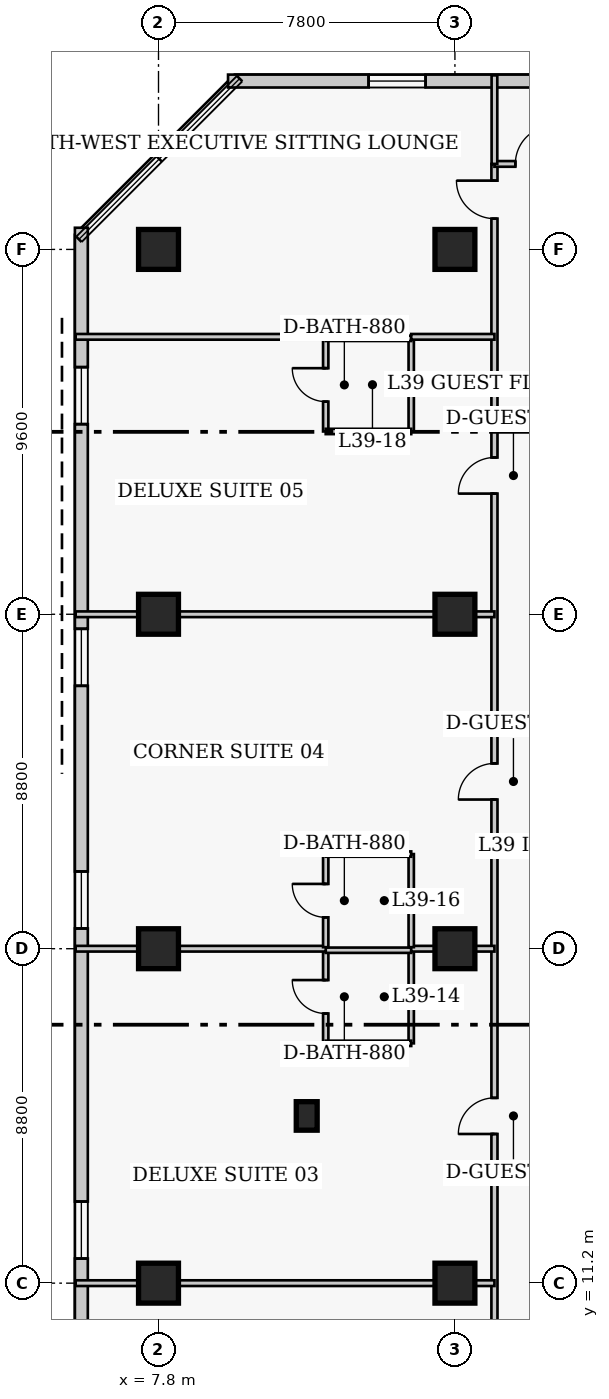
"""IFC4 building model, lengths in metres.
Left out: names, types, materials, properties, quantities, classifications, styles, units other than length and angle.
Written with IfcOpenShell. Run it as: python <this file> out.ifc"""

import sys

from ifc_helpers import new_model, si_unit, direction, frame, frame_2d, origin, origin_2d, place, context, subcontext, project, spatial, rectangle, extrude, element, fill, save


model = new_model("IFC4")
c1 = context("Model", 3, precision=1e-05, world=origin(), true_north=direction((0.0, 1.0)))
c2 = subcontext(c1, "Body", "Model", "MODEL_VIEW")
j1 = project(units=[si_unit("LENGTHUNIT", "METRE"), si_unit("PLANEANGLEUNIT", "RADIAN")], contexts=[c1])
p1 = place(None, origin())
s1 = spatial("IfcSite", under=j1, at=p1, CompositionType="ELEMENT")
p2 = place(p1, origin())
s2 = spatial("IfcBuilding", under=s1, at=p2, CompositionType="ELEMENT")
p3 = place(p2, frame((0.0, 0.0, 157.4)))
s3 = spatial("IfcBuildingStorey", under=s2, at=p3, CompositionType="ELEMENT", Elevation=157.4)
for number, where, z_axis, x_axis in (
    (1, (7.8, 11.2, 0.0), (0.0, 0.0, 1.0), (1.0, 0.0, 0.0)),
    (2, (7.8, 20.0, 0.0), (0.0, 0.0, 1.0), (1.0, 0.0, 0.0)),
    (3, (7.8, 28.8, 0.0), (0.0, 0.0, 1.0), (1.0, 0.0, 0.0)),
    (4, (7.8, 38.4, 0.0), (0.0, 0.0, 1.0), (1.0, 0.0, 0.0)),
    (5, (15.6, 11.2, 0.0), (0.0, 0.0, 1.0), (1.0, 0.0, 0.0)),
    (6, (15.6, 20.0, 0.0), (0.0, 0.0, 1.0), (1.0, 0.0, 0.0)),
    (7, (15.6, 28.8, 0.0), (0.0, 0.0, 1.0), (1.0, 0.0, 0.0)),
    (8, (15.6, 38.4, 0.0), (0.0, 0.0, 1.0), (1.0, 0.0, 0.0)),
):
    element("IfcColumn", number, at=place(p3, frame(where, z_axis=z_axis, x_axis=x_axis)), inside=s3, PredefinedType="COLUMN", context=c2, shape_type="SweptSolid", body=[
        extrude(rectangle(XDim=1.05, YDim=1.05, at=origin_2d()), origin(), (0.0, 0.0, 1.0), 3.8),
    ])
p4 = place(p3, frame((11.7, 15.6, 0.0), z_axis=(0.0, 0.0, 1.0), x_axis=(1.0, 0.0, 0.0)))
e9 = element("IfcColumn", 9, at=p4, inside=s3, PredefinedType="PILASTER", context=c2, shape_type="SweptSolid", body=[
    extrude(rectangle(XDim=0.55, YDim=0.75, at=origin_2d()), origin(), (0.0, 0.0, 1.0), 3.8),
])
p5 = place(p3, frame((36.32, 42.83, 0.0), z_axis=(0.0, 0.0, 1.0), x_axis=(-1.0, 0.0, 0.0)))
e10 = element("IfcWall", 10, at=p5, inside=s3, PredefinedType="SOLIDWALL", context=c2, shape_type="SweptSolid", body=[
    extrude(rectangle(XDim=26.69, YDim=0.34, at=frame_2d((13.345, 0.0))), origin(), (0.0, 0.0, 1.0), 3.55),
])
p6 = place(p5, frame((2.548, 0.0, 0.85)))
e11 = element("IfcOpeningElement", 11, at=p6, cuts=e10, PredefinedType="OPENING", context=c2, shape_type="SweptSolid", body=[
    extrude(rectangle(XDim=1.5, YDim=1.75, at=frame_2d((0.75, 0.875))), frame((0.0, 0.18, 0.0), z_axis=(0.0, -1.0, 0.0), x_axis=(1.0, 0.0, 0.0)), (0.0, 0.0, 1.0), 0.36),
])
p7 = place(p5, frame((12.595, 0.0, 0.85)))
e12 = element("IfcOpeningElement", 12, at=p7, cuts=e10, PredefinedType="OPENING", context=c2, shape_type="SweptSolid", body=[
    extrude(rectangle(XDim=1.5, YDim=1.75, at=frame_2d((0.75, 0.875))), frame((0.0, 0.18, 0.0), z_axis=(0.0, -1.0, 0.0), x_axis=(1.0, 0.0, 0.0)), (0.0, 0.0, 1.0), 0.36),
])
p8 = place(p5, frame((21.492, 0.0, 0.85)))
e13 = element("IfcOpeningElement", 13, at=p8, cuts=e10, PredefinedType="OPENING", context=c2, shape_type="SweptSolid", body=[
    extrude(rectangle(XDim=1.5, YDim=1.75, at=frame_2d((0.75, 0.875))), frame((0.0, 0.18, 0.0), z_axis=(0.0, -1.0, 0.0), x_axis=(1.0, 0.0, 0.0)), (0.0, 0.0, 1.0), 0.36),
])
p9 = place(p3, frame((5.77, 38.97, 0.0), z_axis=(0.0, 0.0, 1.0), x_axis=(0.0, -1.0, 0.0)))
e14 = element("IfcWall", 14, at=p9, inside=s3, PredefinedType="SOLIDWALL", context=c2, shape_type="SweptSolid", body=[
    extrude(rectangle(XDim=30.14, YDim=0.34, at=frame_2d((15.07, 0.0))), origin(), (0.0, 0.0, 1.0), 3.55),
])
p10 = place(p9, frame((3.667, 0.0, 0.85)))
e15 = element("IfcOpeningElement", 15, at=p10, cuts=e14, PredefinedType="OPENING", context=c2, shape_type="SweptSolid", body=[
    extrude(rectangle(XDim=1.5, YDim=1.75, at=frame_2d((0.75, 0.875))), frame((0.0, 0.18, 0.0), z_axis=(0.0, -1.0, 0.0), x_axis=(1.0, 0.0, 0.0)), (0.0, 0.0, 1.0), 0.36),
])
p11 = place(p9, frame((10.552, 0.0, 0.85)))
e16 = element("IfcOpeningElement", 16, at=p11, cuts=e14, PredefinedType="OPENING", context=c2, shape_type="SweptSolid", body=[
    extrude(rectangle(XDim=1.5, YDim=1.75, at=frame_2d((0.75, 0.875))), frame((0.0, 0.18, 0.0), z_axis=(0.0, -1.0, 0.0), x_axis=(1.0, 0.0, 0.0)), (0.0, 0.0, 1.0), 0.36),
])
p12 = place(p9, frame((16.938, 0.0, 0.85)))
e17 = element("IfcOpeningElement", 17, at=p12, cuts=e14, PredefinedType="OPENING", context=c2, shape_type="SweptSolid", body=[
    extrude(rectangle(XDim=1.5, YDim=1.75, at=frame_2d((0.75, 0.875))), frame((0.0, 0.18, 0.0), z_axis=(0.0, -1.0, 0.0), x_axis=(1.0, 0.0, 0.0)), (0.0, 0.0, 1.0), 0.36),
])
p13 = place(p9, frame((25.623, 0.0, 0.85)))
e18 = element("IfcOpeningElement", 18, at=p13, cuts=e14, PredefinedType="OPENING", context=c2, shape_type="SweptSolid", body=[
    extrude(rectangle(XDim=1.5, YDim=1.75, at=frame_2d((0.75, 0.875))), frame((0.0, 0.18, 0.0), z_axis=(0.0, -1.0, 0.0), x_axis=(1.0, 0.0, 0.0)), (0.0, 0.0, 1.0), 0.36),
])
p14 = place(p3, frame((16.64, 6.85, 0.0), z_axis=(0.0, 0.0, 1.0), x_axis=(0.0, 1.0, 0.0)))
e19 = element("IfcWall", 19, at=p14, inside=s3, PredefinedType="PARTITIONING", context=c2, shape_type="SweptSolid", body=[
    extrude(rectangle(XDim=33.8, YDim=0.16, at=frame_2d((16.9, 0.0))), origin(), (0.0, 0.0, 1.0), 3.55),
])
p15 = place(p14, frame((1.7, 0.0, 0.0)))
e20 = element("IfcOpeningElement", 20, at=p15, cuts=e19, PredefinedType="OPENING", context=c2, shape_type="SweptSolid", body=[
    extrude(rectangle(XDim=0.95, YDim=2.1, at=frame_2d((0.475, 1.05))), frame((0.0, 0.09, 0.0), z_axis=(0.0, -1.0, 0.0), x_axis=(1.0, 0.0, 0.0)), (0.0, 0.0, 1.0), 0.18),
])
p16 = place(p14, frame((8.275, 0.0, 0.0)))
e21 = element("IfcOpeningElement", 21, at=p16, cuts=e19, PredefinedType="OPENING", context=c2, shape_type="SweptSolid", body=[
    extrude(rectangle(XDim=0.95, YDim=2.1, at=frame_2d((0.475, 1.05))), frame((0.0, 0.09, 0.0), z_axis=(0.0, -1.0, 0.0), x_axis=(1.0, 0.0, 0.0)), (0.0, 0.0, 1.0), 0.18),
])
p17 = place(p14, frame((17.075, 0.0, 0.0)))
e22 = element("IfcOpeningElement", 22, at=p17, cuts=e19, PredefinedType="OPENING", context=c2, shape_type="SweptSolid", body=[
    extrude(rectangle(XDim=0.95, YDim=2.1, at=frame_2d((0.475, 1.05))), frame((0.0, 0.09, 0.0), z_axis=(0.0, -1.0, 0.0), x_axis=(1.0, 0.0, 0.0)), (0.0, 0.0, 1.0), 0.18),
])
p18 = place(p14, frame((25.125, 0.0, 0.0)))
e23 = element("IfcOpeningElement", 23, at=p18, cuts=e19, PredefinedType="OPENING", context=c2, shape_type="SweptSolid", body=[
    extrude(rectangle(XDim=0.95, YDim=2.1, at=frame_2d((0.475, 1.05))), frame((0.0, 0.09, 0.0), z_axis=(0.0, -1.0, 0.0), x_axis=(1.0, 0.0, 0.0)), (0.0, 0.0, 1.0), 0.18),
])
p19 = place(p14, frame((32.36, 0.0, 0.0)))
e24 = element("IfcOpeningElement", 24, at=p19, cuts=e19, PredefinedType="OPENING", context=c2, shape_type="SweptSolid", body=[
    extrude(rectangle(XDim=1.0, YDim=2.15, at=frame_2d((0.5, 1.075))), frame((0.0, 0.09, 0.0), z_axis=(0.0, -1.0, 0.0), x_axis=(1.0, 0.0, 0.0)), (0.0, 0.0, 1.0), 0.18),
])
p20 = place(p3, frame((16.64, 40.65, 0.0), z_axis=(0.0, 0.0, 1.0), x_axis=(1.0, 0.0, 0.0)))
e25 = element("IfcWall", 25, at=p20, inside=s3, PredefinedType="PARTITIONING", context=c2, shape_type="SweptSolid", body=[
    extrude(rectangle(XDim=5.46, YDim=0.15, at=frame_2d((2.73, 0.0))), origin(), (0.0, 0.0, 1.0), 3.55),
])
p21 = place(p20, frame((0.55, 0.0, 0.0)))
e26 = element("IfcOpeningElement", 26, at=p21, cuts=e25, PredefinedType="OPENING", context=c2, shape_type="SweptSolid", body=[
    extrude(rectangle(XDim=1.0, YDim=2.15, at=frame_2d((0.5, 1.075))), frame((0.0, 0.085, 0.0), z_axis=(0.0, -1.0, 0.0), x_axis=(1.0, 0.0, 0.0)), (0.0, 0.0, 1.0), 0.17),
])
p22 = place(p3, frame((16.64, 40.65, 0.0), z_axis=(0.0, 0.0, 1.0), x_axis=(0.0, 1.0, 0.0)))
e27 = element("IfcWall", 27, at=p22, inside=s3, PredefinedType="PARTITIONING", context=c2, shape_type="SweptSolid", body=[
    extrude(rectangle(XDim=2.33, YDim=0.15, at=frame_2d((1.165, 0.0))), origin(), (0.0, 0.0, 1.0), 3.55),
])
p23 = place(p3, frame((5.62, 11.2, 0.0), z_axis=(0.0, 0.0, 1.0), x_axis=(1.0, 0.0, 0.0)))
e28 = element("IfcWall", 28, at=p23, inside=s3, PredefinedType="PARTITIONING", context=c2, shape_type="SweptSolid", body=[
    extrude(rectangle(XDim=11.02, YDim=0.15, at=frame_2d((5.51, 0.0))), origin(), (0.0, 0.0, 1.0), 2.778),
])
p24 = place(p3, frame((12.2, 17.51, 0.0), z_axis=(0.0, 0.0, 1.0), x_axis=(0.0, 1.0, 0.0)))
e29 = element("IfcWall", 29, at=p24, inside=s3, PredefinedType="PLUMBINGWALL", context=c2, shape_type="SweptSolid", body=[
    extrude(rectangle(XDim=2.45, YDim=0.14, at=frame_2d((1.225, 0.0))), origin(), (0.0, 0.0, 1.0), 3.55),
])
p25 = place(p24, frame((0.785, 0.0, 0.0)))
e30 = element("IfcOpeningElement", 30, at=p25, cuts=e29, PredefinedType="OPENING", context=c2, shape_type="SweptSolid", body=[
    extrude(rectangle(XDim=0.88, YDim=2.05, at=frame_2d((0.44, 1.025))), frame((0.0, 0.08, 0.0), z_axis=(0.0, -1.0, 0.0), x_axis=(1.0, 0.0, 0.0)), (0.0, 0.0, 1.0), 0.16),
])
p26 = place(p3, frame((14.45, 17.51, 0.0), z_axis=(0.0, 0.0, 1.0), x_axis=(0.0, 1.0, 0.0)))
e31 = element("IfcWall", 31, at=p26, inside=s3, PredefinedType="PLUMBINGWALL", context=c2, shape_type="SweptSolid", body=[
    extrude(rectangle(XDim=2.45, YDim=0.14, at=frame_2d((1.225, 0.0))), origin(), (0.0, 0.0, 1.0), 3.55),
])
p27 = place(p3, frame((12.2, 17.51, 0.0), z_axis=(0.0, 0.0, 1.0), x_axis=(1.0, 0.0, 0.0)))
e32 = element("IfcWall", 32, at=p27, inside=s3, PredefinedType="PLUMBINGWALL", context=c2, shape_type="SweptSolid", body=[
    extrude(rectangle(XDim=2.25, YDim=0.14, at=frame_2d((1.125, 0.0))), origin(), (0.0, 0.0, 1.0), 3.55),
])
p28 = place(p3, frame((12.2, 19.96, 0.0), z_axis=(0.0, 0.0, 1.0), x_axis=(1.0, 0.0, 0.0)))
e33 = element("IfcWall", 33, at=p28, inside=s3, PredefinedType="PLUMBINGWALL", context=c2, shape_type="SweptSolid", body=[
    extrude(rectangle(XDim=2.25, YDim=0.14, at=frame_2d((1.125, 0.0))), origin(), (0.0, 0.0, 1.0), 2.9),
])
p29 = place(p3, frame((5.62, 20.0, 0.0), z_axis=(0.0, 0.0, 1.0), x_axis=(1.0, 0.0, 0.0)))
e34 = element("IfcWall", 34, at=p29, inside=s3, PredefinedType="PARTITIONING", context=c2, shape_type="SweptSolid", body=[
    extrude(rectangle(XDim=6.58, YDim=0.15, at=frame_2d((3.29, 0.0))), origin(), (0.0, 0.0, 1.0), 2.778),
])
p30 = place(p3, frame((14.45, 20.0, 0.0), z_axis=(0.0, 0.0, 1.0), x_axis=(1.0, 0.0, 0.0)))
e35 = element("IfcWall", 35, at=p30, inside=s3, PredefinedType="PARTITIONING", context=c2, shape_type="SweptSolid", body=[
    extrude(rectangle(XDim=2.19, YDim=0.15, at=frame_2d((1.095, 0.0))), origin(), (0.0, 0.0, 1.0), 2.778),
])
p31 = place(p3, frame((12.2, 20.04, 0.0), z_axis=(0.0, 0.0, 1.0), x_axis=(0.0, 1.0, 0.0)))
e36 = element("IfcWall", 36, at=p31, inside=s3, PredefinedType="PLUMBINGWALL", context=c2, shape_type="SweptSolid", body=[
    extrude(rectangle(XDim=2.45, YDim=0.14, at=frame_2d((1.225, 0.0))), origin(), (0.0, 0.0, 1.0), 3.55),
])
p32 = place(p31, frame((0.785, 0.0, 0.0)))
e37 = element("IfcOpeningElement", 37, at=p32, cuts=e36, PredefinedType="OPENING", context=c2, shape_type="SweptSolid", body=[
    extrude(rectangle(XDim=0.88, YDim=2.05, at=frame_2d((0.44, 1.025))), frame((0.0, 0.08, 0.0), z_axis=(0.0, -1.0, 0.0), x_axis=(1.0, 0.0, 0.0)), (0.0, 0.0, 1.0), 0.16),
])
p33 = place(p3, frame((14.45, 20.04, 0.0), z_axis=(0.0, 0.0, 1.0), x_axis=(0.0, 1.0, 0.0)))
e38 = element("IfcWall", 38, at=p33, inside=s3, PredefinedType="PLUMBINGWALL", context=c2, shape_type="SweptSolid", body=[
    extrude(rectangle(XDim=2.45, YDim=0.14, at=frame_2d((1.225, 0.0))), origin(), (0.0, 0.0, 1.0), 3.55),
])
p34 = place(p3, frame((12.2, 22.49, 0.0), z_axis=(0.0, 0.0, 1.0), x_axis=(1.0, 0.0, 0.0)))
e39 = element("IfcWall", 39, at=p34, inside=s3, PredefinedType="PLUMBINGWALL", context=c2, shape_type="SweptSolid", body=[
    extrude(rectangle(XDim=2.25, YDim=0.14, at=frame_2d((1.125, 0.0))), origin(), (0.0, 0.0, 1.0), 3.55),
])
p35 = place(p3, frame((5.62, 28.8, 0.0), z_axis=(0.0, 0.0, 1.0), x_axis=(1.0, 0.0, 0.0)))
e40 = element("IfcWall", 40, at=p35, inside=s3, PredefinedType="PARTITIONING", context=c2, shape_type="SweptSolid", body=[
    extrude(rectangle(XDim=11.02, YDim=0.15, at=frame_2d((5.51, 0.0))), origin(), (0.0, 0.0, 1.0), 2.778),
])
p36 = place(p3, frame((12.2, 33.61, 0.0), z_axis=(0.0, 0.0, 1.0), x_axis=(0.0, 1.0, 0.0)))
e41 = element("IfcWall", 41, at=p36, inside=s3, PredefinedType="PLUMBINGWALL", context=c2, shape_type="SweptSolid", body=[
    extrude(rectangle(XDim=2.45, YDim=0.14, at=frame_2d((1.225, 0.0))), origin(), (0.0, 0.0, 1.0), 3.55),
])
p37 = place(p36, frame((0.785, 0.0, 0.0)))
e42 = element("IfcOpeningElement", 42, at=p37, cuts=e41, PredefinedType="OPENING", context=c2, shape_type="SweptSolid", body=[
    extrude(rectangle(XDim=0.88, YDim=2.05, at=frame_2d((0.44, 1.025))), frame((0.0, 0.08, 0.0), z_axis=(0.0, -1.0, 0.0), x_axis=(1.0, 0.0, 0.0)), (0.0, 0.0, 1.0), 0.16),
])
p38 = place(p3, frame((14.45, 33.61, 0.0), z_axis=(0.0, 0.0, 1.0), x_axis=(0.0, 1.0, 0.0)))
e43 = element("IfcWall", 43, at=p38, inside=s3, PredefinedType="PLUMBINGWALL", context=c2, shape_type="SweptSolid", body=[
    extrude(rectangle(XDim=2.45, YDim=0.14, at=frame_2d((1.225, 0.0))), origin(), (0.0, 0.0, 1.0), 3.55),
])
for number, where, z_axis, x_axis in (
    (44, (12.2, 33.61, 0.0), (0.0, 0.0, 1.0), (1.0, 0.0, 0.0)),
    (45, (12.2, 36.06, 0.0), (0.0, 0.0, 1.0), (1.0, 0.0, 0.0)),
):
    element("IfcWall", number, at=place(p3, frame(where, z_axis=z_axis, x_axis=x_axis)), inside=s3, PredefinedType="PLUMBINGWALL", context=c2, shape_type="SweptSolid", body=[
        extrude(rectangle(XDim=2.25, YDim=0.14, at=frame_2d((1.125, 0.0))), origin(), (0.0, 0.0, 1.0), 3.55),
    ])
p39 = place(p3, frame((5.62, 36.1, 0.0), z_axis=(0.0, 0.0, 1.0), x_axis=(1.0, 0.0, 0.0)))
e46 = element("IfcWall", 46, at=p39, inside=s3, PredefinedType="PARTITIONING", context=c2, shape_type="SweptSolid", body=[
    extrude(rectangle(XDim=6.58, YDim=0.15, at=frame_2d((3.29, 0.0))), origin(), (0.0, 0.0, 1.0), 3.55),
])
p40 = place(p3, frame((14.45, 36.1, 0.0), z_axis=(0.0, 0.0, 1.0), x_axis=(1.0, 0.0, 0.0)))
e47 = element("IfcWall", 47, at=p40, inside=s3, PredefinedType="PARTITIONING", context=c2, shape_type="SweptSolid", body=[
    extrude(rectangle(XDim=2.19, YDim=0.15, at=frame_2d((1.095, 0.0))), origin(), (0.0, 0.0, 1.0), 3.55),
])
p41 = place(p8, origin())
e48 = element("IfcWindow", 48, at=p41, inside=s3, PartitioningType="SINGLE_PANEL", PredefinedType="WINDOW", context=c2, shape_type="SweptSolid", body=[
    extrude(rectangle(XDim=1.5, YDim=1.75, at=frame_2d((0.75, 0.875))), frame((0.0, 0.03, 0.0), z_axis=(0.0, -1.0, 0.0), x_axis=(1.0, 0.0, 0.0)), (0.0, 0.0, 1.0), 0.06),
])
fill(e13, e48)
p42 = place(p10, origin())
e49 = element("IfcWindow", 49, at=p42, inside=s3, PartitioningType="SINGLE_PANEL", PredefinedType="WINDOW", context=c2, shape_type="SweptSolid", body=[
    extrude(rectangle(XDim=1.5, YDim=1.75, at=frame_2d((0.75, 0.875))), frame((0.0, 0.03, 0.0), z_axis=(0.0, -1.0, 0.0), x_axis=(1.0, 0.0, 0.0)), (0.0, 0.0, 1.0), 0.06),
])
fill(e15, e49)
p43 = place(p11, origin())
e50 = element("IfcWindow", 50, at=p43, inside=s3, PartitioningType="SINGLE_PANEL", PredefinedType="WINDOW", context=c2, shape_type="SweptSolid", body=[
    extrude(rectangle(XDim=1.5, YDim=1.75, at=frame_2d((0.75, 0.875))), frame((0.0, 0.03, 0.0), z_axis=(0.0, -1.0, 0.0), x_axis=(1.0, 0.0, 0.0)), (0.0, 0.0, 1.0), 0.06),
])
fill(e16, e50)
p44 = place(p12, origin())
e51 = element("IfcWindow", 51, at=p44, inside=s3, PartitioningType="SINGLE_PANEL", PredefinedType="WINDOW", context=c2, shape_type="SweptSolid", body=[
    extrude(rectangle(XDim=1.5, YDim=1.75, at=frame_2d((0.75, 0.875))), frame((0.0, 0.03, 0.0), z_axis=(0.0, -1.0, 0.0), x_axis=(1.0, 0.0, 0.0)), (0.0, 0.0, 1.0), 0.06),
])
fill(e17, e51)
p45 = place(p13, origin())
e52 = element("IfcWindow", 52, at=p45, inside=s3, PartitioningType="SINGLE_PANEL", PredefinedType="WINDOW", context=c2, shape_type="SweptSolid", body=[
    extrude(rectangle(XDim=1.5, YDim=1.75, at=frame_2d((0.75, 0.875))), frame((0.0, 0.03, 0.0), z_axis=(0.0, -1.0, 0.0), x_axis=(1.0, 0.0, 0.0)), (0.0, 0.0, 1.0), 0.06),
])
fill(e18, e52)
p46 = place(p21, origin())
e53 = element("IfcDoor", 53, at=p46, inside=s3, OperationType="SINGLE_SWING_RIGHT", PredefinedType="DOOR", context=c2, shape_type="SweptSolid", body=[
    extrude(rectangle(XDim=1.0, YDim=2.15, at=frame_2d((0.5, 1.075))), frame((0.0, 0.025, 0.0), z_axis=(0.0, -1.0, 0.0), x_axis=(1.0, 0.0, 0.0)), (0.0, 0.0, 1.0), 0.05),
])
fill(e26, e53)
p47 = place(p25, origin())
e54 = element("IfcDoor", 54, at=p47, inside=s3, OperationType="SINGLE_SWING_RIGHT", PredefinedType="DOOR", context=c2, shape_type="SweptSolid", body=[
    extrude(rectangle(XDim=0.88, YDim=2.05, at=frame_2d((0.44, 1.025))), frame((0.0, 0.025, 0.0), z_axis=(0.0, -1.0, 0.0), x_axis=(1.0, 0.0, 0.0)), (0.0, 0.0, 1.0), 0.05),
])
fill(e30, e54)
p48 = place(p16, origin())
e55 = element("IfcDoor", 55, at=p48, inside=s3, OperationType="SINGLE_SWING_LEFT", PredefinedType="DOOR", context=c2, shape_type="SweptSolid", body=[
    extrude(rectangle(XDim=0.95, YDim=2.1, at=frame_2d((0.475, 1.05))), frame((0.0, 0.025, 0.0), z_axis=(0.0, -1.0, 0.0), x_axis=(1.0, 0.0, 0.0)), (0.0, 0.0, 1.0), 0.05),
])
fill(e21, e55)
p49 = place(p32, origin())
e56 = element("IfcDoor", 56, at=p49, inside=s3, OperationType="SINGLE_SWING_RIGHT", PredefinedType="DOOR", context=c2, shape_type="SweptSolid", body=[
    extrude(rectangle(XDim=0.88, YDim=2.05, at=frame_2d((0.44, 1.025))), frame((0.0, 0.025, 0.0), z_axis=(0.0, -1.0, 0.0), x_axis=(1.0, 0.0, 0.0)), (0.0, 0.0, 1.0), 0.05),
])
fill(e37, e56)
p50 = place(p17, origin())
e57 = element("IfcDoor", 57, at=p50, inside=s3, OperationType="SINGLE_SWING_LEFT", PredefinedType="DOOR", context=c2, shape_type="SweptSolid", body=[
    extrude(rectangle(XDim=0.95, YDim=2.1, at=frame_2d((0.475, 1.05))), frame((0.0, 0.025, 0.0), z_axis=(0.0, -1.0, 0.0), x_axis=(1.0, 0.0, 0.0)), (0.0, 0.0, 1.0), 0.05),
])
fill(e22, e57)
p51 = place(p37, origin())
e58 = element("IfcDoor", 58, at=p51, inside=s3, OperationType="SINGLE_SWING_RIGHT", PredefinedType="DOOR", context=c2, shape_type="SweptSolid", body=[
    extrude(rectangle(XDim=0.88, YDim=2.05, at=frame_2d((0.44, 1.025))), frame((0.0, 0.025, 0.0), z_axis=(0.0, -1.0, 0.0), x_axis=(1.0, 0.0, 0.0)), (0.0, 0.0, 1.0), 0.05),
])
fill(e42, e58)
p52 = place(p18, origin())
e59 = element("IfcDoor", 59, at=p52, inside=s3, OperationType="SINGLE_SWING_LEFT", PredefinedType="DOOR", context=c2, shape_type="SweptSolid", body=[
    extrude(rectangle(XDim=0.95, YDim=2.1, at=frame_2d((0.475, 1.05))), frame((0.0, 0.025, 0.0), z_axis=(0.0, -1.0, 0.0), x_axis=(1.0, 0.0, 0.0)), (0.0, 0.0, 1.0), 0.05),
])
fill(e23, e59)
p53 = place(p19, origin())
e60 = element("IfcDoor", 60, at=p53, inside=s3, OperationType="SINGLE_SWING_RIGHT", PredefinedType="DOOR", context=c2, shape_type="SweptSolid", body=[
    extrude(rectangle(XDim=1.0, YDim=2.15, at=frame_2d((0.5, 1.075))), frame((0.0, 0.025, 0.0), z_axis=(0.0, -1.0, 0.0), x_axis=(1.0, 0.0, 0.0)), (0.0, 0.0, 1.0), 0.05),
])
fill(e24, e60)
save(model, sys.argv[1])
